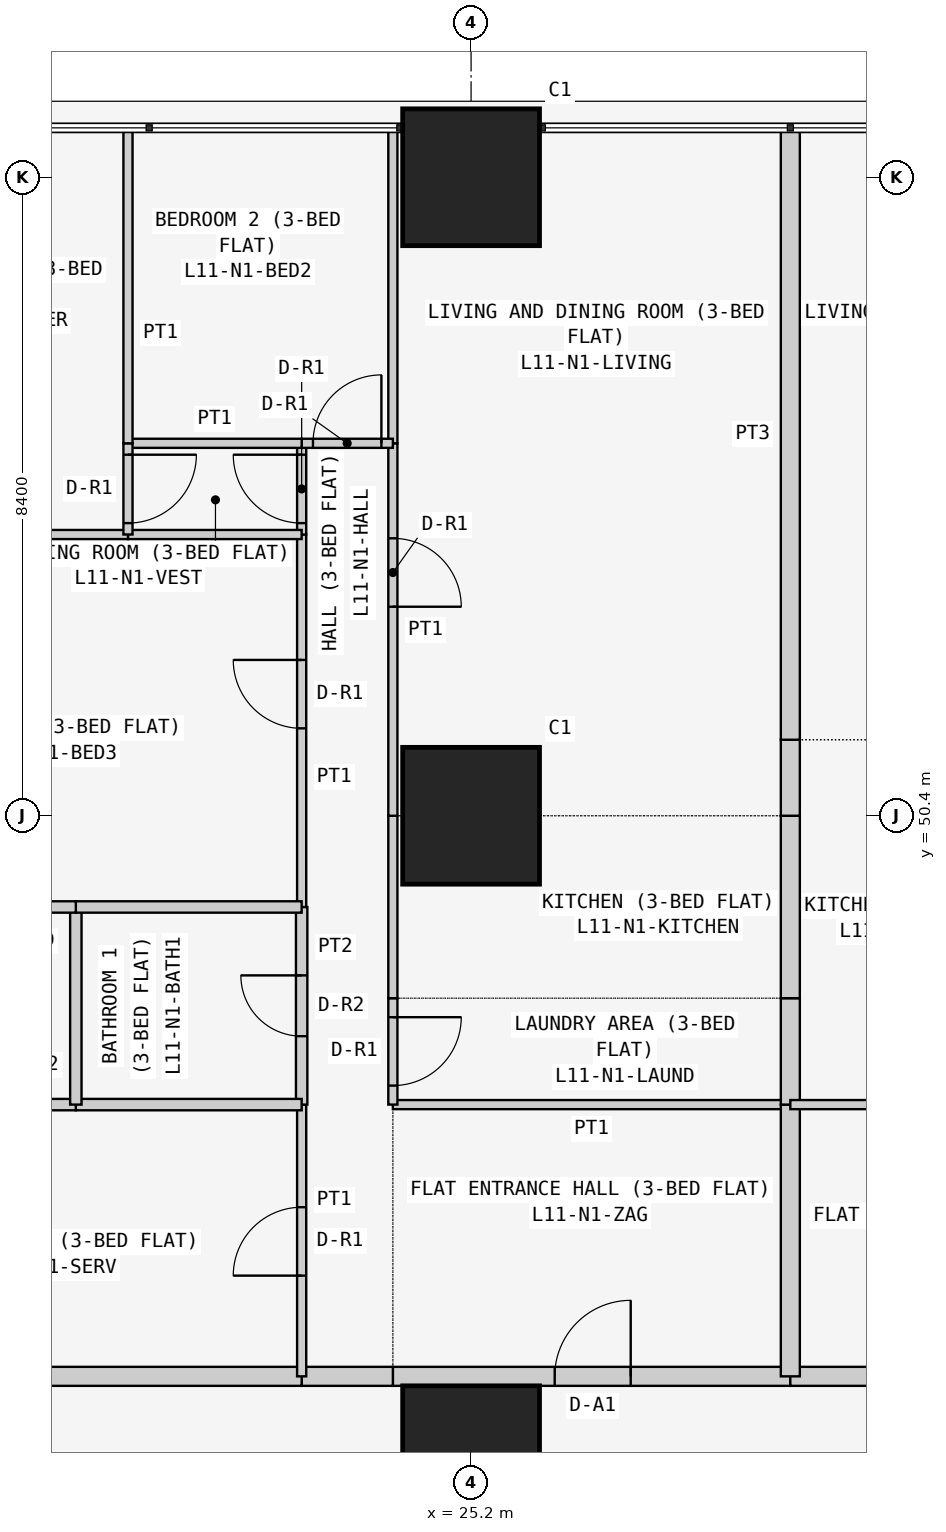
"""IFC4 building model, lengths in metres.
Left out: names, types, materials, properties, quantities, classifications, styles, units other than length and angle.
Written with IfcOpenShell. Run it as: python <this file> out.ifc"""

import sys

from ifc_helpers import new_model, si_unit, direction, frame, frame_2d, origin, origin_2d, place, context, subcontext, project, spatial, rectangle, extrude, element, fill, save


model = new_model("IFC4")
c1 = context("Model", 3, precision=1e-05, world=origin(), true_north=direction((0.0, 1.0)))
c2 = subcontext(c1, "Body", "Model", "MODEL_VIEW")
j1 = project(units=[si_unit("LENGTHUNIT", "METRE"), si_unit("PLANEANGLEUNIT", "RADIAN")], contexts=[c1])
p1 = place(None, origin())
s1 = spatial("IfcSite", under=j1, at=p1, CompositionType="ELEMENT")
p2 = place(p1, origin())
s2 = spatial("IfcBuilding", under=s1, at=p2, CompositionType="ELEMENT")
p3 = place(p2, frame((0.0, 0.0, 48.9)))
s3 = spatial("IfcBuildingStorey", under=s2, at=p3, CompositionType="ELEMENT", Elevation=48.9)
for number, where, z_axis, x_axis in (
    (1, (25.2, 42.0, 0.0), (0.0, 0.0, 1.0), (1.0, 0.0, 0.0)),
    (2, (25.2, 50.4, 0.0), (0.0, 0.0, 1.0), (1.0, 0.0, 0.0)),
    (3, (25.2, 58.8, 0.0), (0.0, 0.0, 1.0), (1.0, 0.0, 0.0)),
):
    element("IfcColumn", number, at=place(p3, frame(where, z_axis=z_axis, x_axis=x_axis)), inside=s3, PredefinedType="COLUMN", context=c2, shape_type="SweptSolid", body=[
        extrude(rectangle(XDim=1.8, YDim=1.8, at=origin_2d()), origin(), (0.0, 0.0, 1.0), 3.6),
    ])
p4 = place(p3, frame((24.171, 43.025, 0.0), z_axis=(0.0, 0.0, 1.0), x_axis=(1.0, 0.0, 0.0)))
e4 = element("IfcWall", 4, at=p4, inside=s3, PredefinedType="PARTITIONING", context=c2, shape_type="SweptSolid", body=[
    extrude(rectangle(XDim=5.229, YDim=0.25, at=frame_2d((2.615, 0.0))), origin(), (0.0, 0.0, 1.0), 3.45),
])
p5 = place(p4, frame((2.129, 0.0, 0.0)))
e5 = element("IfcOpeningElement", 5, at=p5, cuts=e4, PredefinedType="OPENING", context=c2, shape_type="SweptSolid", body=[
    extrude(rectangle(XDim=1.0, YDim=2.1, at=frame_2d((0.5, 1.05))), frame((0.0, 0.135, 0.0), z_axis=(0.0, -1.0, 0.0), x_axis=(1.0, 0.0, 0.0)), (0.0, 0.0, 1.0), 0.27),
])
p6 = place(p3, frame((22.971, 43.025, 0.0), z_axis=(0.0, 0.0, 1.0), x_axis=(1.0, 0.0, 0.0)))
e6 = element("IfcWall", 6, at=p6, inside=s3, PredefinedType="PARTITIONING", context=c2, shape_type="SweptSolid", body=[
    extrude(rectangle(XDim=1.2, YDim=0.25, at=frame_2d((0.6, 0.0))), origin(), (0.0, 0.0, 1.0), 3.45),
])
p7 = place(p3, frame((16.1, 43.025, 0.0), z_axis=(0.0, 0.0, 1.0), x_axis=(1.0, 0.0, 0.0)))
e7 = element("IfcWall", 7, at=p7, inside=s3, PredefinedType="PARTITIONING", context=c2, shape_type="SweptSolid", body=[
    extrude(rectangle(XDim=6.871, YDim=0.25, at=frame_2d((3.436, 0.0))), origin(), (0.0, 0.0, 1.0), 3.45),
])
p8 = place(p3, frame((29.4, 43.025, 0.0), z_axis=(0.0, 0.0, 1.0), x_axis=(1.0, 0.0, 0.0)))
e8 = element("IfcWall", 8, at=p8, inside=s3, PredefinedType="PARTITIONING", context=c2, shape_type="SweptSolid", body=[
    extrude(rectangle(XDim=5.229, YDim=0.25, at=frame_2d((2.615, 0.0))), origin(), (0.0, 0.0, 1.0), 3.45),
])
p9 = place(p8, frame((2.1, 0.0, 0.0)))
e9 = element("IfcOpeningElement", 9, at=p9, cuts=e8, PredefinedType="OPENING", context=c2, shape_type="SweptSolid", body=[
    extrude(rectangle(XDim=1.0, YDim=2.1, at=frame_2d((0.5, 1.05))), frame((0.0, 0.135, 0.0), z_axis=(0.0, -1.0, 0.0), x_axis=(1.0, 0.0, 0.0)), (0.0, 0.0, 1.0), 0.27),
])
p10 = place(p3, frame((29.4, 46.6, 0.0), z_axis=(0.0, 0.0, 1.0), x_axis=(-1.0, 0.0, 0.0)))
e10 = element("IfcWall", 10, at=p10, inside=s3, PredefinedType="PARTITIONING", context=c2, shape_type="SweptSolid", body=[
    extrude(rectangle(XDim=5.229, YDim=0.12, at=frame_2d((2.615, 0.0))), origin(), (0.0, 0.0, 1.0), 3.45),
])
p11 = place(p3, frame((29.4, 43.025, 0.0), z_axis=(0.0, 0.0, 1.0), x_axis=(0.0, 1.0, 0.0)))
e11 = element("IfcWall", 11, at=p11, inside=s3, PredefinedType="PARTITIONING", context=c2, shape_type="SweptSolid", body=[
    extrude(rectangle(XDim=3.575, YDim=0.25, at=frame_2d((1.788, 0.0))), origin(), (0.0, 0.0, 1.0), 2.848),
])
p12 = place(p3, frame((24.171, 48.0, 0.0), z_axis=(0.0, 0.0, 1.0), x_axis=(0.0, -1.0, 0.0)))
e12 = element("IfcWall", 12, at=p12, inside=s3, PredefinedType="PARTITIONING", context=c2, shape_type="SweptSolid", body=[
    extrude(rectangle(XDim=1.4, YDim=0.12, at=frame_2d((0.7, 0.0))), origin(), (0.0, 0.0, 1.0), 3.45),
])
p13 = place(p12, frame((0.25, 0.0, 0.0)))
e13 = element("IfcOpeningElement", 13, at=p13, cuts=e12, PredefinedType="OPENING", context=c2, shape_type="SweptSolid", body=[
    extrude(rectangle(XDim=0.9, YDim=2.1, at=frame_2d((0.45, 1.05))), frame((0.0, 0.07, 0.0), z_axis=(0.0, -1.0, 0.0), x_axis=(1.0, 0.0, 0.0)), (0.0, 0.0, 1.0), 0.14),
])
p14 = place(p3, frame((29.4, 46.6, 0.0), z_axis=(0.0, 0.0, 1.0), x_axis=(0.0, 1.0, 0.0)))
e14 = element("IfcWall", 14, at=p14, inside=s3, PredefinedType="PARTITIONING", context=c2, shape_type="SweptSolid", body=[
    extrude(rectangle(XDim=1.4, YDim=0.25, at=frame_2d((0.7, 0.0))), origin(), (0.0, 0.0, 1.0), 2.848),
])
p15 = place(p3, frame((24.171, 50.4, 0.0), z_axis=(0.0, 0.0, 1.0), x_axis=(0.0, -1.0, 0.0)))
e15 = element("IfcWall", 15, at=p15, inside=s3, PredefinedType="PARTITIONING", context=c2, shape_type="SweptSolid", body=[
    extrude(rectangle(XDim=2.4, YDim=0.12, at=frame_2d((1.2, 0.0))), origin(), (0.0, 0.0, 1.0), 3.45),
])
p16 = place(p3, frame((29.4, 48.0, 0.0), z_axis=(0.0, 0.0, 1.0), x_axis=(0.0, 1.0, 0.0)))
e16 = element("IfcWall", 16, at=p16, inside=s3, PredefinedType="PARTITIONING", context=c2, shape_type="SweptSolid", body=[
    extrude(rectangle(XDim=2.4, YDim=0.25, at=frame_2d((1.2, 0.0))), origin(), (0.0, 0.0, 1.0), 2.848),
])
p17 = place(p3, frame((24.171, 55.3, 0.0), z_axis=(0.0, 0.0, 1.0), x_axis=(0.0, -1.0, 0.0)))
e17 = element("IfcWall", 17, at=p17, inside=s3, PredefinedType="PARTITIONING", context=c2, shape_type="SweptSolid", body=[
    extrude(rectangle(XDim=4.9, YDim=0.12, at=frame_2d((2.45, 0.0))), origin(), (0.0, 0.0, 1.0), 3.45),
])
p18 = place(p17, frame((1.25, 0.0, 0.0)))
e18 = element("IfcOpeningElement", 18, at=p18, cuts=e17, PredefinedType="OPENING", context=c2, shape_type="SweptSolid", body=[
    extrude(rectangle(XDim=0.9, YDim=2.1, at=frame_2d((0.45, 1.05))), frame((0.0, 0.07, 0.0), z_axis=(0.0, -1.0, 0.0), x_axis=(1.0, 0.0, 0.0)), (0.0, 0.0, 1.0), 0.14),
])
p19 = place(p3, frame((24.171, 59.45, 0.0), z_axis=(0.0, 0.0, 1.0), x_axis=(0.0, -1.0, 0.0)))
e19 = element("IfcWall", 19, at=p19, inside=s3, PredefinedType="PARTITIONING", context=c2, shape_type="SweptSolid", body=[
    extrude(rectangle(XDim=4.15, YDim=0.12, at=frame_2d((2.075, 0.0))), origin(), (0.0, 0.0, 1.0), 3.45),
])
p20 = place(p3, frame((29.4, 50.4, 0.0), z_axis=(0.0, 0.0, 1.0), x_axis=(0.0, 1.0, 0.0)))
e20 = element("IfcWall", 20, at=p20, inside=s3, PredefinedType="PARTITIONING", context=c2, shape_type="SweptSolid", body=[
    extrude(rectangle(XDim=1.0, YDim=0.25, at=frame_2d((0.5, 0.0))), origin(), (0.0, 0.0, 1.0), 2.848),
])
p21 = place(p3, frame((29.4, 51.4, 0.0), z_axis=(0.0, 0.0, 1.0), x_axis=(0.0, 1.0, 0.0)))
e21 = element("IfcWall", 21, at=p21, inside=s3, PredefinedType="PARTITIONING", context=c2, shape_type="SweptSolid", body=[
    extrude(rectangle(XDim=8.05, YDim=0.25, at=frame_2d((4.025, 0.0))), origin(), (0.0, 0.0, 1.0), 2.848),
])
p22 = place(p3, frame((22.971, 46.6, 0.0), z_axis=(0.0, 0.0, 1.0), x_axis=(0.0, -1.0, 0.0)))
e22 = element("IfcWall", 22, at=p22, inside=s3, PredefinedType="PARTITIONING", context=c2, shape_type="SweptSolid", body=[
    extrude(rectangle(XDim=3.575, YDim=0.12, at=frame_2d((1.788, 0.0))), origin(), (0.0, 0.0, 1.0), 3.45),
])
p23 = place(p22, frame((1.35, 0.0, 0.0)))
e23 = element("IfcOpeningElement", 23, at=p23, cuts=e22, PredefinedType="OPENING", context=c2, shape_type="SweptSolid", body=[
    extrude(rectangle(XDim=0.9, YDim=2.1, at=frame_2d((0.45, 1.05))), frame((0.0, 0.07, 0.0), z_axis=(0.0, -1.0, 0.0), x_axis=(1.0, 0.0, 0.0)), (0.0, 0.0, 1.0), 0.14),
])
p24 = place(p3, frame((22.971, 49.2, 0.0), z_axis=(0.0, 0.0, 1.0), x_axis=(0.0, -1.0, 0.0)))
e24 = element("IfcWall", 24, at=p24, inside=s3, PredefinedType="PARTITIONING", context=c2, shape_type="SweptSolid", body=[
    extrude(rectangle(XDim=2.6, YDim=0.15, at=frame_2d((1.3, 0.0))), origin(), (0.0, 0.0, 1.0), 3.45),
])
p25 = place(p24, frame((0.9, 0.0, 0.0)))
e25 = element("IfcOpeningElement", 25, at=p25, cuts=e24, PredefinedType="OPENING", context=c2, shape_type="SweptSolid", body=[
    extrude(rectangle(XDim=0.8, YDim=2.1, at=frame_2d((0.4, 1.05))), frame((0.0, 0.085, 0.0), z_axis=(0.0, -1.0, 0.0), x_axis=(1.0, 0.0, 0.0)), (0.0, 0.0, 1.0), 0.17),
])
p26 = place(p3, frame((22.971, 54.1, 0.0), z_axis=(0.0, 0.0, 1.0), x_axis=(0.0, -1.0, 0.0)))
e26 = element("IfcWall", 26, at=p26, inside=s3, PredefinedType="PARTITIONING", context=c2, shape_type="SweptSolid", body=[
    extrude(rectangle(XDim=4.9, YDim=0.12, at=frame_2d((2.45, 0.0))), origin(), (0.0, 0.0, 1.0), 3.45),
])
p27 = place(p26, frame((1.65, 0.0, 0.0)))
e27 = element("IfcOpeningElement", 27, at=p27, cuts=e26, PredefinedType="OPENING", context=c2, shape_type="SweptSolid", body=[
    extrude(rectangle(XDim=0.9, YDim=2.1, at=frame_2d((0.45, 1.05))), frame((0.0, 0.07, 0.0), z_axis=(0.0, -1.0, 0.0), x_axis=(1.0, 0.0, 0.0)), (0.0, 0.0, 1.0), 0.14),
])
p28 = place(p3, frame((22.971, 55.3, 0.0), z_axis=(0.0, 0.0, 1.0), x_axis=(0.0, -1.0, 0.0)))
e28 = element("IfcWall", 28, at=p28, inside=s3, PredefinedType="PARTITIONING", context=c2, shape_type="SweptSolid", body=[
    extrude(rectangle(XDim=1.2, YDim=0.12, at=frame_2d((0.6, 0.0))), origin(), (0.0, 0.0, 1.0), 3.45),
])
p29 = place(p28, frame((0.15, 0.0, 0.0)))
e29 = element("IfcOpeningElement", 29, at=p29, cuts=e28, PredefinedType="OPENING", context=c2, shape_type="SweptSolid", body=[
    extrude(rectangle(XDim=0.9, YDim=2.1, at=frame_2d((0.45, 1.05))), frame((0.0, 0.07, 0.0), z_axis=(0.0, -1.0, 0.0), x_axis=(1.0, 0.0, 0.0)), (0.0, 0.0, 1.0), 0.14),
])
p30 = place(p3, frame((24.171, 55.3, 0.0), z_axis=(0.0, 0.0, 1.0), x_axis=(-1.0, 0.0, 0.0)))
e30 = element("IfcWall", 30, at=p30, inside=s3, PredefinedType="PARTITIONING", context=c2, shape_type="SweptSolid", body=[
    extrude(rectangle(XDim=1.2, YDim=0.12, at=frame_2d((0.6, 0.0))), origin(), (0.0, 0.0, 1.0), 3.45),
])
p31 = place(p30, frame((0.151, 0.0, 0.0)))
e31 = element("IfcOpeningElement", 31, at=p31, cuts=e30, PredefinedType="OPENING", context=c2, shape_type="SweptSolid", body=[
    extrude(rectangle(XDim=0.9, YDim=2.1, at=frame_2d((0.45, 1.05))), frame((0.0, 0.07, 0.0), z_axis=(0.0, -1.0, 0.0), x_axis=(1.0, 0.0, 0.0)), (0.0, 0.0, 1.0), 0.14),
])
p32 = place(p3, frame((22.971, 46.6, 0.0), z_axis=(0.0, 0.0, 1.0), x_axis=(-1.0, 0.0, 0.0)))
e32 = element("IfcWall", 32, at=p32, inside=s3, PredefinedType="PARTITIONING", context=c2, shape_type="SweptSolid", body=[
    extrude(rectangle(XDim=2.971, YDim=0.15, at=frame_2d((1.485, 0.0))), origin(), (0.0, 0.0, 1.0), 3.45),
])
p33 = place(p3, frame((20.0, 46.6, 0.0), z_axis=(0.0, 0.0, 1.0), x_axis=(-1.0, 0.0, 0.0)))
e33 = element("IfcWall", 33, at=p33, inside=s3, PredefinedType="PARTITIONING", context=c2, shape_type="SweptSolid", body=[
    extrude(rectangle(XDim=3.9, YDim=0.15, at=frame_2d((1.95, 0.0))), origin(), (0.0, 0.0, 1.0), 3.45),
])
p34 = place(p33, frame((1.45, 0.0, 0.0)))
e34 = element("IfcOpeningElement", 34, at=p34, cuts=e33, PredefinedType="OPENING", context=c2, shape_type="SweptSolid", body=[
    extrude(rectangle(XDim=0.8, YDim=2.1, at=frame_2d((0.4, 1.05))), frame((0.0, 0.085, 0.0), z_axis=(0.0, -1.0, 0.0), x_axis=(1.0, 0.0, 0.0)), (0.0, 0.0, 1.0), 0.17),
])
p35 = place(p3, frame((20.0, 49.2, 0.0), z_axis=(0.0, 0.0, 1.0), x_axis=(0.0, -1.0, 0.0)))
e35 = element("IfcWall", 35, at=p35, inside=s3, PredefinedType="PARTITIONING", context=c2, shape_type="SweptSolid", body=[
    extrude(rectangle(XDim=2.6, YDim=0.15, at=frame_2d((1.3, 0.0))), origin(), (0.0, 0.0, 1.0), 3.45),
])
p36 = place(p3, frame((22.971, 49.2, 0.0), z_axis=(0.0, 0.0, 1.0), x_axis=(-1.0, 0.0, 0.0)))
e36 = element("IfcWall", 36, at=p36, inside=s3, PredefinedType="PARTITIONING", context=c2, shape_type="SweptSolid", body=[
    extrude(rectangle(XDim=2.971, YDim=0.15, at=frame_2d((1.485, 0.0))), origin(), (0.0, 0.0, 1.0), 3.45),
])
p37 = place(p3, frame((20.0, 49.2, 0.0), z_axis=(0.0, 0.0, 1.0), x_axis=(-1.0, 0.0, 0.0)))
e37 = element("IfcWall", 37, at=p37, inside=s3, PredefinedType="PARTITIONING", context=c2, shape_type="SweptSolid", body=[
    extrude(rectangle(XDim=3.9, YDim=0.15, at=frame_2d((1.95, 0.0))), origin(), (0.0, 0.0, 1.0), 3.45),
])
p38 = place(p3, frame((22.971, 54.1, 0.0), z_axis=(0.0, 0.0, 1.0), x_axis=(-1.0, 0.0, 0.0)))
e38 = element("IfcWall", 38, at=p38, inside=s3, PredefinedType="PARTITIONING", context=c2, shape_type="SweptSolid", body=[
    extrude(rectangle(XDim=2.285, YDim=0.12, at=frame_2d((1.143, 0.0))), origin(), (0.0, 0.0, 1.0), 3.45),
])
p39 = place(p3, frame((20.686, 54.1, 0.0), z_axis=(0.0, 0.0, 1.0), x_axis=(-1.0, 0.0, 0.0)))
e39 = element("IfcWall", 39, at=p39, inside=s3, PredefinedType="PARTITIONING", context=c2, shape_type="SweptSolid", body=[
    extrude(rectangle(XDim=4.586, YDim=0.12, at=frame_2d((2.293, 0.0))), origin(), (0.0, 0.0, 1.0), 3.45),
])
p40 = place(p3, frame((22.971, 55.3, 0.0), z_axis=(0.0, 0.0, 1.0), x_axis=(-1.0, 0.0, 0.0)))
e40 = element("IfcWall", 40, at=p40, inside=s3, PredefinedType="PARTITIONING", context=c2, shape_type="SweptSolid", body=[
    extrude(rectangle(XDim=2.285, YDim=0.12, at=frame_2d((1.143, 0.0))), origin(), (0.0, 0.0, 1.0), 3.45),
])
p41 = place(p3, frame((20.686, 55.3, 0.0), z_axis=(0.0, 0.0, 1.0), x_axis=(0.0, -1.0, 0.0)))
e41 = element("IfcWall", 41, at=p41, inside=s3, PredefinedType="PARTITIONING", context=c2, shape_type="SweptSolid", body=[
    extrude(rectangle(XDim=1.2, YDim=0.12, at=frame_2d((0.6, 0.0))), origin(), (0.0, 0.0, 1.0), 3.45),
])
p42 = place(p41, frame((0.15, 0.0, 0.0)))
e42 = element("IfcOpeningElement", 42, at=p42, cuts=e41, PredefinedType="OPENING", context=c2, shape_type="SweptSolid", body=[
    extrude(rectangle(XDim=0.9, YDim=2.1, at=frame_2d((0.45, 1.05))), frame((0.0, 0.07, 0.0), z_axis=(0.0, -1.0, 0.0), x_axis=(1.0, 0.0, 0.0)), (0.0, 0.0, 1.0), 0.14),
])
p43 = place(p3, frame((20.686, 59.45, 0.0), z_axis=(0.0, 0.0, 1.0), x_axis=(0.0, -1.0, 0.0)))
e43 = element("IfcWall", 43, at=p43, inside=s3, PredefinedType="PARTITIONING", context=c2, shape_type="SweptSolid", body=[
    extrude(rectangle(XDim=4.15, YDim=0.12, at=frame_2d((2.075, 0.0))), origin(), (0.0, 0.0, 1.0), 3.45),
])
p44 = place(p3, frame((29.4, 46.6, 0.0), z_axis=(0.0, 0.0, 1.0), x_axis=(1.0, 0.0, 0.0)))
e44 = element("IfcWall", 44, at=p44, inside=s3, PredefinedType="PARTITIONING", context=c2, shape_type="SweptSolid", body=[
    extrude(rectangle(XDim=5.229, YDim=0.12, at=frame_2d((2.615, 0.0))), origin(), (0.0, 0.0, 1.0), 3.45),
])
p45 = place(p44, frame((1.05, 0.0, 0.0)))
e45 = element("IfcOpeningElement", 45, at=p45, cuts=e44, PredefinedType="OPENING", context=c2, shape_type="SweptSolid", body=[
    extrude(rectangle(XDim=0.9, YDim=2.1, at=frame_2d((0.45, 1.05))), frame((0.0, 0.07, 0.0), z_axis=(0.0, -1.0, 0.0), x_axis=(1.0, 0.0, 0.0)), (0.0, 0.0, 1.0), 0.14),
])
p46 = place(p5, origin())
e46 = element("IfcDoor", 46, at=p46, inside=s3, OperationType="SINGLE_SWING_RIGHT", PredefinedType="DOOR", context=c2, shape_type="SweptSolid", body=[
    extrude(rectangle(XDim=1.0, YDim=2.1, at=frame_2d((0.5, 1.05))), frame((0.0, 0.025, 0.0), z_axis=(0.0, -1.0, 0.0), x_axis=(1.0, 0.0, 0.0)), (0.0, 0.0, 1.0), 0.05),
])
fill(e5, e46)
p47 = place(p13, origin())
e47 = element("IfcDoor", 47, at=p47, inside=s3, OperationType="SINGLE_SWING_LEFT", PredefinedType="DOOR", context=c2, shape_type="SweptSolid", body=[
    extrude(rectangle(XDim=0.9, YDim=2.1, at=frame_2d((0.45, 1.05))), frame((0.0, 0.025, 0.0), z_axis=(0.0, -1.0, 0.0), x_axis=(1.0, 0.0, 0.0)), (0.0, 0.0, 1.0), 0.05),
])
fill(e13, e47)
p48 = place(p18, origin())
e48 = element("IfcDoor", 48, at=p48, inside=s3, OperationType="SINGLE_SWING_RIGHT", PredefinedType="DOOR", context=c2, shape_type="SweptSolid", body=[
    extrude(rectangle(XDim=0.9, YDim=2.1, at=frame_2d((0.45, 1.05))), frame((0.0, 0.025, 0.0), z_axis=(0.0, -1.0, 0.0), x_axis=(1.0, 0.0, 0.0)), (0.0, 0.0, 1.0), 0.05),
])
fill(e18, e48)
p49 = place(p23, frame((0.9, 0.0, 0.0), z_axis=(0.0, 0.0, 1.0), x_axis=(-1.0, 0.0, 0.0)))
e49 = element("IfcDoor", 49, at=p49, inside=s3, OperationType="SINGLE_SWING_LEFT", PredefinedType="DOOR", context=c2, shape_type="SweptSolid", body=[
    extrude(rectangle(XDim=0.9, YDim=2.1, at=frame_2d((0.45, 1.05))), frame((0.0, 0.025, 0.0), z_axis=(0.0, -1.0, 0.0), x_axis=(1.0, 0.0, 0.0)), (0.0, 0.0, 1.0), 0.05),
])
fill(e23, e49)
p50 = place(p25, frame((0.8, 0.0, 0.0), z_axis=(0.0, 0.0, 1.0), x_axis=(-1.0, 0.0, 0.0)))
e50 = element("IfcDoor", 50, at=p50, inside=s3, OperationType="SINGLE_SWING_RIGHT", PredefinedType="DOOR", context=c2, shape_type="SweptSolid", body=[
    extrude(rectangle(XDim=0.8, YDim=2.1, at=frame_2d((0.4, 1.05))), frame((0.0, 0.025, 0.0), z_axis=(0.0, -1.0, 0.0), x_axis=(1.0, 0.0, 0.0)), (0.0, 0.0, 1.0), 0.05),
])
fill(e25, e50)
p51 = place(p27, frame((0.9, 0.0, 0.0), z_axis=(0.0, 0.0, 1.0), x_axis=(-1.0, 0.0, 0.0)))
e51 = element("IfcDoor", 51, at=p51, inside=s3, OperationType="SINGLE_SWING_RIGHT", PredefinedType="DOOR", context=c2, shape_type="SweptSolid", body=[
    extrude(rectangle(XDim=0.9, YDim=2.1, at=frame_2d((0.45, 1.05))), frame((0.0, 0.025, 0.0), z_axis=(0.0, -1.0, 0.0), x_axis=(1.0, 0.0, 0.0)), (0.0, 0.0, 1.0), 0.05),
])
fill(e27, e51)
p52 = place(p29, frame((0.9, 0.0, 0.0), z_axis=(0.0, 0.0, 1.0), x_axis=(-1.0, 0.0, 0.0)))
e52 = element("IfcDoor", 52, at=p52, inside=s3, OperationType="SINGLE_SWING_RIGHT", PredefinedType="DOOR", context=c2, shape_type="SweptSolid", body=[
    extrude(rectangle(XDim=0.9, YDim=2.1, at=frame_2d((0.45, 1.05))), frame((0.0, 0.025, 0.0), z_axis=(0.0, -1.0, 0.0), x_axis=(1.0, 0.0, 0.0)), (0.0, 0.0, 1.0), 0.05),
])
fill(e29, e52)
p53 = place(p42, origin())
e53 = element("IfcDoor", 53, at=p53, inside=s3, OperationType="SINGLE_SWING_LEFT", PredefinedType="DOOR", context=c2, shape_type="SweptSolid", body=[
    extrude(rectangle(XDim=0.9, YDim=2.1, at=frame_2d((0.45, 1.05))), frame((0.0, 0.025, 0.0), z_axis=(0.0, -1.0, 0.0), x_axis=(1.0, 0.0, 0.0)), (0.0, 0.0, 1.0), 0.05),
])
fill(e42, e53)
p54 = place(p31, frame((0.9, 0.0, 0.0), z_axis=(0.0, 0.0, 1.0), x_axis=(-1.0, 0.0, 0.0)))
e54 = element("IfcDoor", 54, at=p54, inside=s3, OperationType="SINGLE_SWING_RIGHT", PredefinedType="DOOR", context=c2, shape_type="SweptSolid", body=[
    extrude(rectangle(XDim=0.9, YDim=2.1, at=frame_2d((0.45, 1.05))), frame((0.0, 0.025, 0.0), z_axis=(0.0, -1.0, 0.0), x_axis=(1.0, 0.0, 0.0)), (0.0, 0.0, 1.0), 0.05),
])
fill(e31, e54)
save(model, sys.argv[1])
